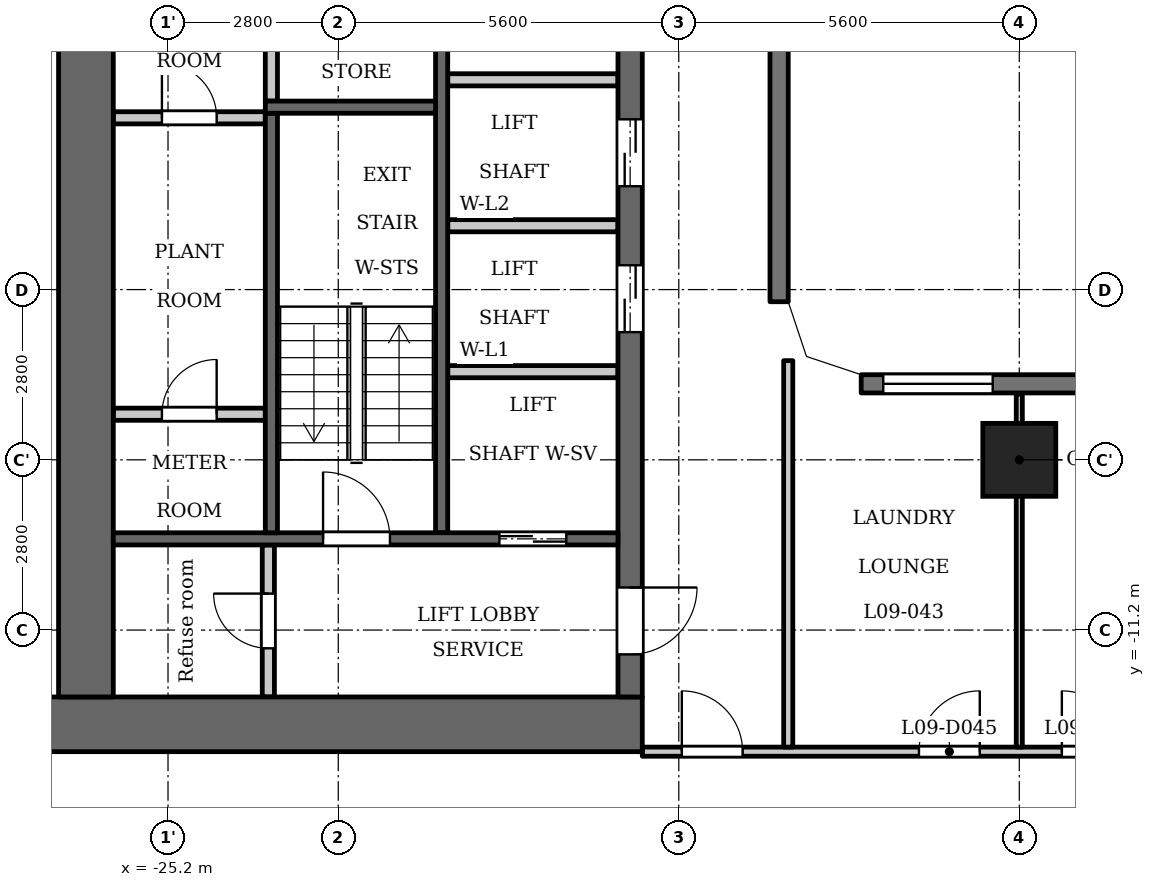
"""IFC4 building model, lengths in metres.
Left out: names, types, materials, properties, quantities, classifications, styles, units other than length and angle.
Written with IfcOpenShell. Run it as: python <this file> out.ifc"""

import sys

from ifc_helpers import new_model, si_unit, direction, frame, frame_2d, origin, origin_2d, place, context, subcontext, project, spatial, polyline, rectangle, outline, extrude, element, fill, save


model = new_model("IFC4")
c1 = context("Model", 3, precision=1e-05, world=origin(), true_north=direction((0.0, 1.0)))
c2 = subcontext(c1, "Body", "Model", "MODEL_VIEW")
j1 = project(units=[si_unit("LENGTHUNIT", "METRE"), si_unit("PLANEANGLEUNIT", "RADIAN")], contexts=[c1])
p1 = place(None, origin())
s1 = spatial("IfcSite", under=j1, at=p1, CompositionType="ELEMENT")
p2 = place(p1, origin())
s2 = spatial("IfcBuilding", under=s1, at=p2, CompositionType="ELEMENT")
p3 = place(p2, frame((0.0, 0.0, 41.0)))
s3 = spatial("IfcBuildingStorey", under=s2, at=p3, CompositionType="ELEMENT", Elevation=41.0)
p4 = place(p3, frame((-11.2, -8.4, 0.0), z_axis=(0.0, 0.0, 1.0), x_axis=(1.0, 0.0, 0.0)))
e1 = element("IfcColumn", 1, at=p4, inside=s3, PredefinedType="COLUMN", context=c2, shape_type="SweptSolid", body=[
    extrude(rectangle(XDim=1.2, YDim=1.2, at=origin_2d()), origin(), (0.0, 0.0, 1.0), 3.5),
])
p5 = place(p3, frame((-15.15, -5.8, 0.0), z_axis=(0.0, 0.0, 1.0), x_axis=(0.0, 1.0, 0.0)))
e2 = element("IfcWall", 2, at=p5, inside=s3, PredefinedType="SOLIDWALL", context=c2, shape_type="SweptSolid", body=[
    extrude(rectangle(XDim=11.6, YDim=0.3, at=frame_2d((5.8, 0.0))), origin(), (0.0, 0.0, 1.0), 3.2),
])
p6 = place(p3, frame((13.8, -7.15, 0.0), z_axis=(0.0, 0.0, 1.0), x_axis=(-1.0, 0.0, 0.0)))
e3 = element("IfcWall", 3, at=p6, inside=s3, PredefinedType="SOLIDWALL", context=c2, shape_type="SweptSolid", body=[
    extrude(rectangle(XDim=27.6, YDim=0.3, at=frame_2d((13.8, 0.0))), origin(), (0.0, 0.0, 1.0), 3.2),
])
p7 = place(p6, frame((0.363, 0.0, 0.9)))
e4 = element("IfcOpeningElement", 4, at=p7, cuts=e3, PredefinedType="OPENING", context=c2, shape_type="SweptSolid", body=[
    extrude(rectangle(XDim=1.8, YDim=1.25, at=frame_2d((0.9, 0.625))), frame((0.0, 0.16, 0.0), z_axis=(0.0, -1.0, 0.0), x_axis=(1.0, 0.0, 0.0)), (0.0, 0.0, 1.0), 0.32),
])
p8 = place(p6, frame((3.6, 0.0, 1.2)))
e5 = element("IfcOpeningElement", 5, at=p8, cuts=e3, PredefinedType="OPENING", context=c2, shape_type="SweptSolid", body=[
    extrude(rectangle(XDim=3.6, YDim=0.95, at=frame_2d((1.8, 0.475))), frame((0.0, 0.16, 0.0), z_axis=(0.0, -1.0, 0.0), x_axis=(1.0, 0.0, 0.0)), (0.0, 0.0, 1.0), 0.32),
])
p9 = place(p6, frame((9.2, 0.0, 1.2)))
e6 = element("IfcOpeningElement", 6, at=p9, cuts=e3, PredefinedType="OPENING", context=c2, shape_type="SweptSolid", body=[
    extrude(rectangle(XDim=3.6, YDim=0.95, at=frame_2d((1.8, 0.475))), frame((0.0, 0.16, 0.0), z_axis=(0.0, -1.0, 0.0), x_axis=(1.0, 0.0, 0.0)), (0.0, 0.0, 1.0), 0.32),
])
p10 = place(p6, frame((14.8, 0.0, 1.2)))
e7 = element("IfcOpeningElement", 7, at=p10, cuts=e3, PredefinedType="OPENING", context=c2, shape_type="SweptSolid", body=[
    extrude(rectangle(XDim=3.6, YDim=0.95, at=frame_2d((1.8, 0.475))), frame((0.0, 0.16, 0.0), z_axis=(0.0, -1.0, 0.0), x_axis=(1.0, 0.0, 0.0)), (0.0, 0.0, 1.0), 0.32),
])
p11 = place(p6, frame((20.4, 0.0, 1.2)))
e8 = element("IfcOpeningElement", 8, at=p11, cuts=e3, PredefinedType="OPENING", context=c2, shape_type="SweptSolid", body=[
    extrude(rectangle(XDim=3.6, YDim=0.95, at=frame_2d((1.8, 0.475))), frame((0.0, 0.16, 0.0), z_axis=(0.0, -1.0, 0.0), x_axis=(1.0, 0.0, 0.0)), (0.0, 0.0, 1.0), 0.32),
])
p12 = place(p6, frame((25.438, 0.0, 0.9)))
e9 = element("IfcOpeningElement", 9, at=p12, cuts=e3, PredefinedType="OPENING", context=c2, shape_type="SweptSolid", body=[
    extrude(rectangle(XDim=1.8, YDim=1.25, at=frame_2d((0.9, 0.625))), frame((0.0, 0.16, 0.0), z_axis=(0.0, -1.0, 0.0), x_axis=(1.0, 0.0, 0.0)), (0.0, 0.0, 1.0), 0.32),
])
p13 = place(p3, frame((-23.5, -2.5, 0.0), z_axis=(0.0, 0.0, 1.0), x_axis=(0.0, 1.0, 0.0)))
e10 = element("IfcWall", 10, at=p13, inside=s3, PredefinedType="PARTITIONING", context=c2, shape_type="SweptSolid", body=[
    extrude(rectangle(XDim=2.65, YDim=0.2, at=frame_2d((1.325, 0.0))), origin(), (0.0, 0.0, 1.0), 3.2),
])
p14 = place(p3, frame((-20.7, -9.6, 0.0), z_axis=(0.0, 0.0, 1.0), x_axis=(0.0, 1.0, 0.0)))
e11 = element("IfcWall", 11, at=p14, inside=s3, PredefinedType="SHEAR", context=c2, shape_type="SweptSolid", body=[
    extrude(rectangle(XDim=9.75, YDim=0.2, at=frame_2d((4.875, 0.0))), origin(), (0.0, 0.0, 1.0), 3.2),
])
p15 = place(p3, frame((-17.4, -12.75, 0.0), z_axis=(0.0, 0.0, 1.0), x_axis=(-1.0, 0.0, 0.0)))
e12 = element("IfcWall", 12, at=p15, inside=s3, PredefinedType="SHEAR", context=c2, shape_type="SweptSolid", body=[
    extrude(rectangle(XDim=10.4, YDim=0.9, at=frame_2d((5.2, 0.0))), origin(), (0.0, 0.0, 1.0), 3.2),
])
p16 = place(p3, frame((-17.6, -12.3, 0.0), z_axis=(0.0, 0.0, 1.0), x_axis=(0.0, 1.0, 0.0)))
e13 = element("IfcWall", 13, at=p16, inside=s3, PredefinedType="SHEAR", context=c2, shape_type="SweptSolid", body=[
    extrude(rectangle(XDim=24.6, YDim=0.4, at=frame_2d((12.3, 0.0))), origin(), (0.0, 0.0, 1.0), 3.2),
])
p17 = place(p16, frame((6.0, 0.0, 0.0)))
e14 = element("IfcOpeningElement", 14, at=p17, cuts=e13, PredefinedType="OPENING", context=c2, shape_type="SweptSolid", body=[
    extrude(rectangle(XDim=1.1, YDim=2.1, at=frame_2d((0.55, 1.05))), frame((0.0, 0.21, 0.0), z_axis=(0.0, -1.0, 0.0), x_axis=(1.0, 0.0, 0.0)), (0.0, 0.0, 1.0), 0.42),
])
p18 = place(p16, frame((8.4, 0.0, 0.0)))
e15 = element("IfcOpeningElement", 15, at=p18, cuts=e13, PredefinedType="OPENING", context=c2, shape_type="SweptSolid", body=[
    extrude(rectangle(XDim=1.1, YDim=2.1, at=frame_2d((0.55, 1.05))), frame((0.0, 0.21, 0.0), z_axis=(0.0, -1.0, 0.0), x_axis=(1.0, 0.0, 0.0)), (0.0, 0.0, 1.0), 0.42),
])
p19 = place(p16, frame((10.8, 0.0, 0.0)))
e16 = element("IfcOpeningElement", 16, at=p19, cuts=e13, PredefinedType="OPENING", context=c2, shape_type="SweptSolid", body=[
    extrude(rectangle(XDim=1.1, YDim=2.1, at=frame_2d((0.55, 1.05))), frame((0.0, 0.21, 0.0), z_axis=(0.0, -1.0, 0.0), x_axis=(1.0, 0.0, 0.0)), (0.0, 0.0, 1.0), 0.42),
])
p20 = place(p16, frame((16.75, 0.0, 0.0)))
e17 = element("IfcOpeningElement", 17, at=p20, cuts=e13, PredefinedType="OPENING", context=c2, shape_type="SweptSolid", body=[
    extrude(rectangle(XDim=0.9, YDim=2.1, at=frame_2d((0.45, 1.05))), frame((0.0, 0.21, 0.0), z_axis=(0.0, -1.0, 0.0), x_axis=(1.0, 0.0, 0.0)), (0.0, 0.0, 1.0), 0.42),
])
p21 = place(p16, frame((22.8, 0.0, 0.0)))
e18 = element("IfcOpeningElement", 18, at=p21, cuts=e13, PredefinedType="OPENING", context=c2, shape_type="SweptSolid", body=[
    extrude(rectangle(XDim=1.1, YDim=2.1, at=frame_2d((0.55, 1.05))), frame((0.0, 0.21, 0.0), z_axis=(0.0, -1.0, 0.0), x_axis=(1.0, 0.0, 0.0)), (0.0, 0.0, 1.0), 0.42),
])
p22 = place(p16, frame((0.7, 0.0, 0.0)))
e19 = element("IfcOpeningElement", 19, at=p22, cuts=e13, PredefinedType="OPENING", context=c2, shape_type="SweptSolid", body=[
    extrude(rectangle(XDim=1.1, YDim=2.1, at=frame_2d((0.55, 1.05))), frame((0.0, 0.21, 0.0), z_axis=(0.0, -1.0, 0.0), x_axis=(1.0, 0.0, 0.0)), (0.0, 0.0, 1.0), 0.42),
])
p23 = place(p16, frame((12.775, 0.0, 0.0)))
e20 = element("IfcOpeningElement", 20, at=p23, cuts=e13, PredefinedType="OPENING", context=c2, shape_type="SweptSolid", body=[
    extrude(rectangle(XDim=1.8, YDim=2.1, at=frame_2d((0.9, 1.05))), frame((0.0, 0.21, 0.0), z_axis=(0.0, -1.0, 0.0), x_axis=(1.0, 0.0, 0.0)), (0.0, 0.0, 1.0), 0.42),
])
p24 = place(p3, frame((-26.55, -12.3, 0.0), z_axis=(0.0, 0.0, 1.0), x_axis=(0.0, 1.0, 0.0)))
e21 = element("IfcWall", 21, at=p24, inside=s3, PredefinedType="SHEAR", context=c2, shape_type="SweptSolid", body=[
    extrude(rectangle(XDim=24.6, YDim=0.9, at=frame_2d((12.3, 0.0))), origin(), (0.0, 0.0, 1.0), 3.2),
])
p25 = place(p3, frame((-23.55, -12.3, 0.0), z_axis=(0.0, 0.0, 1.0), x_axis=(0.0, 1.0, 0.0)))
e22 = element("IfcWall", 22, at=p25, inside=s3, PredefinedType="PARTITIONING", context=c2, shape_type="SweptSolid", body=[
    extrude(rectangle(XDim=2.5, YDim=0.2, at=frame_2d((1.25, 0.0))), origin(), (0.0, 0.0, 1.0), 3.2),
])
p26 = place(p25, frame((0.8, 0.0, 0.0)))
e23 = element("IfcOpeningElement", 23, at=p26, cuts=e22, PredefinedType="OPENING", context=c2, shape_type="SweptSolid", body=[
    extrude(rectangle(XDim=0.9, YDim=2.1, at=frame_2d((0.45, 1.05))), frame((0.0, 0.11, 0.0), z_axis=(0.0, -1.0, 0.0), x_axis=(1.0, 0.0, 0.0)), (0.0, 0.0, 1.0), 0.22),
])
p27 = place(p3, frame((-23.6, -7.65, 0.0), z_axis=(0.0, 0.0, 1.0), x_axis=(-1.0, 0.0, 0.0)))
e24 = element("IfcWall", 24, at=p27, inside=s3, PredefinedType="PARTITIONING", context=c2, shape_type="SweptSolid", body=[
    extrude(rectangle(XDim=2.5, YDim=0.2, at=frame_2d((1.25, 0.0))), origin(), (0.0, 0.0, 1.0), 3.2),
])
p28 = place(p27, frame((0.8, 0.0, 0.0)))
e25 = element("IfcOpeningElement", 25, at=p28, cuts=e24, PredefinedType="OPENING", context=c2, shape_type="SweptSolid", body=[
    extrude(rectangle(XDim=0.9, YDim=2.1, at=frame_2d((0.45, 1.05))), frame((0.0, 0.11, 0.0), z_axis=(0.0, -1.0, 0.0), x_axis=(1.0, 0.0, 0.0)), (0.0, 0.0, 1.0), 0.22),
])
p29 = place(p3, frame((-23.6, -2.775, 0.0), z_axis=(0.0, 0.0, 1.0), x_axis=(-1.0, 0.0, 0.0)))
e26 = element("IfcWall", 26, at=p29, inside=s3, PredefinedType="PARTITIONING", context=c2, shape_type="SweptSolid", body=[
    extrude(rectangle(XDim=2.5, YDim=0.2, at=frame_2d((1.25, 0.0))), origin(), (0.0, 0.0, 1.0), 3.2),
])
p30 = place(p29, frame((0.8, 0.0, 0.0)))
e27 = element("IfcOpeningElement", 27, at=p30, cuts=e26, PredefinedType="OPENING", context=c2, shape_type="SweptSolid", body=[
    extrude(rectangle(XDim=0.9, YDim=2.1, at=frame_2d((0.45, 1.05))), frame((0.0, 0.11, 0.0), z_axis=(0.0, -1.0, 0.0), x_axis=(1.0, 0.0, 0.0)), (0.0, 0.0, 1.0), 0.22),
])
p31 = place(p3, frame((-17.8, -9.7, 0.0), z_axis=(0.0, 0.0, 1.0), x_axis=(-1.0, 0.0, 0.0)))
e28 = element("IfcWall", 28, at=p31, inside=s3, PredefinedType="SHEAR", context=c2, shape_type="SweptSolid", body=[
    extrude(rectangle(XDim=8.3, YDim=0.2, at=frame_2d((4.15, 0.0))), origin(), (0.0, 0.0, 1.0), 3.2),
])
p32 = place(p31, frame((0.85, 0.0, 0.0)))
e29 = element("IfcOpeningElement", 29, at=p32, cuts=e28, PredefinedType="OPENING", context=c2, shape_type="SweptSolid", body=[
    extrude(rectangle(XDim=1.1, YDim=2.1, at=frame_2d((0.55, 1.05))), frame((0.0, 0.11, 0.0), z_axis=(0.0, -1.0, 0.0), x_axis=(1.0, 0.0, 0.0)), (0.0, 0.0, 1.0), 0.22),
])
p33 = place(p31, frame((3.75, 0.0, 0.0)))
e30 = element("IfcOpeningElement", 30, at=p33, cuts=e28, PredefinedType="OPENING", context=c2, shape_type="SweptSolid", body=[
    extrude(rectangle(XDim=1.1, YDim=2.1, at=frame_2d((0.55, 1.05))), frame((0.0, 0.11, 0.0), z_axis=(0.0, -1.0, 0.0), x_axis=(1.0, 0.0, 0.0)), (0.0, 0.0, 1.0), 0.22),
])
for number, where, z_axis, x_axis in (
    (31, (-17.8, -6.95, 0.0), (0.0, 0.0, 1.0), (-1.0, 0.0, 0.0)),
    (32, (-17.8, -4.55, 0.0), (0.0, 0.0, 1.0), (-1.0, 0.0, 0.0)),
    (33, (-17.8, -2.15, 0.0), (0.0, 0.0, 1.0), (-1.0, 0.0, 0.0)),
):
    element("IfcWall", number, at=place(p3, frame(where, z_axis=z_axis, x_axis=x_axis)), inside=s3, PredefinedType="PARTITIONING", context=c2, shape_type="SweptSolid", body=[
        extrude(rectangle(XDim=2.8, YDim=0.2, at=frame_2d((1.4, 0.0))), origin(), (0.0, 0.0, 1.0), 3.2),
    ])
p34 = place(p3, frame((-23.5, -9.6, 0.0), z_axis=(0.0, 0.0, 1.0), x_axis=(0.0, 1.0, 0.0)))
e34 = element("IfcWall", 34, at=p34, inside=s3, PredefinedType="SHEAR", context=c2, shape_type="SweptSolid", body=[
    extrude(rectangle(XDim=6.9, YDim=0.2, at=frame_2d((3.45, 0.0))), origin(), (0.0, 0.0, 1.0), 3.2),
])
p35 = place(p3, frame((-20.8, -2.6, 0.0), z_axis=(0.0, 0.0, 1.0), x_axis=(-1.0, 0.0, 0.0)))
e35 = element("IfcWall", 35, at=p35, inside=s3, PredefinedType="SHEAR", context=c2, shape_type="SweptSolid", body=[
    extrude(rectangle(XDim=2.8, YDim=0.2, at=frame_2d((1.4, 0.0))), origin(), (0.0, 0.0, 1.0), 3.2),
])
p36 = place(p3, frame((-17.4, -13.2, 0.0), z_axis=(0.0, 0.0, 1.0), x_axis=(1.0, 0.0, 0.0)))
e36 = element("IfcWall", 36, at=p36, inside=s3, PredefinedType="PARTITIONING", context=c2, shape_type="SweptSolid", body=[
    extrude(rectangle(XDim=34.8, YDim=0.15, at=frame_2d((17.4, 0.0))), origin(), (0.0, 0.0, 1.0), 3.2),
])
p37 = place(p36, frame((0.65, 0.0, 0.0)))
e37 = element("IfcOpeningElement", 37, at=p37, cuts=e36, PredefinedType="OPENING", context=c2, shape_type="SweptSolid", body=[
    extrude(rectangle(XDim=1.0, YDim=2.1, at=frame_2d((0.5, 1.05))), frame((0.0, 0.085, 0.0), z_axis=(0.0, -1.0, 0.0), x_axis=(1.0, 0.0, 0.0)), (0.0, 0.0, 1.0), 0.17),
])
p38 = place(p36, frame((33.05, 0.0, 0.0)))
e38 = element("IfcOpeningElement", 38, at=p38, cuts=e36, PredefinedType="OPENING", context=c2, shape_type="SweptSolid", body=[
    extrude(rectangle(XDim=1.0, YDim=2.1, at=frame_2d((0.5, 1.05))), frame((0.0, 0.085, 0.0), z_axis=(0.0, -1.0, 0.0), x_axis=(1.0, 0.0, 0.0)), (0.0, 0.0, 1.0), 0.17),
])
p39 = place(p36, frame((4.55, 0.0, 0.0)))
e39 = element("IfcOpeningElement", 39, at=p39, cuts=e36, PredefinedType="OPENING", context=c2, shape_type="SweptSolid", body=[
    extrude(rectangle(XDim=1.0, YDim=2.1, at=frame_2d((0.5, 1.05))), frame((0.0, 0.085, 0.0), z_axis=(0.0, -1.0, 0.0), x_axis=(1.0, 0.0, 0.0)), (0.0, 0.0, 1.0), 0.17),
])
p40 = place(p36, frame((6.9, 0.0, 0.0)))
e40 = element("IfcOpeningElement", 40, at=p40, cuts=e36, PredefinedType="OPENING", context=c2, shape_type="SweptSolid", body=[
    extrude(rectangle(XDim=1.0, YDim=2.1, at=frame_2d((0.5, 1.05))), frame((0.0, 0.085, 0.0), z_axis=(0.0, -1.0, 0.0), x_axis=(1.0, 0.0, 0.0)), (0.0, 0.0, 1.0), 0.17),
])
p41 = place(p36, frame((15.75, 0.0, 0.0)))
e41 = element("IfcOpeningElement", 41, at=p41, cuts=e36, PredefinedType="OPENING", context=c2, shape_type="SweptSolid", body=[
    extrude(rectangle(XDim=1.0, YDim=2.1, at=frame_2d((0.5, 1.05))), frame((0.0, 0.085, 0.0), z_axis=(0.0, -1.0, 0.0), x_axis=(1.0, 0.0, 0.0)), (0.0, 0.0, 1.0), 0.17),
])
p42 = place(p36, frame((18.1, 0.0, 0.0)))
e42 = element("IfcOpeningElement", 42, at=p42, cuts=e36, PredefinedType="OPENING", context=c2, shape_type="SweptSolid", body=[
    extrude(rectangle(XDim=1.0, YDim=2.1, at=frame_2d((0.5, 1.05))), frame((0.0, 0.085, 0.0), z_axis=(0.0, -1.0, 0.0), x_axis=(1.0, 0.0, 0.0)), (0.0, 0.0, 1.0), 0.17),
])
p43 = place(p36, frame((26.95, 0.0, 0.0)))
e43 = element("IfcOpeningElement", 43, at=p43, cuts=e36, PredefinedType="OPENING", context=c2, shape_type="SweptSolid", body=[
    extrude(rectangle(XDim=1.0, YDim=2.1, at=frame_2d((0.5, 1.05))), frame((0.0, 0.085, 0.0), z_axis=(0.0, -1.0, 0.0), x_axis=(1.0, 0.0, 0.0)), (0.0, 0.0, 1.0), 0.17),
])
p44 = place(p36, frame((29.25, 0.0, 0.0)))
e44 = element("IfcOpeningElement", 44, at=p44, cuts=e36, PredefinedType="OPENING", context=c2, shape_type="SweptSolid", body=[
    extrude(rectangle(XDim=1.0, YDim=2.1, at=frame_2d((0.5, 1.05))), frame((0.0, 0.085, 0.0), z_axis=(0.0, -1.0, 0.0), x_axis=(1.0, 0.0, 0.0)), (0.0, 0.0, 1.0), 0.17),
])
p45 = place(p3, frame((-15.0, -13.125, 0.0), z_axis=(0.0, 0.0, 1.0), x_axis=(0.0, 1.0, 0.0)))
e45 = element("IfcWall", 45, at=p45, inside=s3, PredefinedType="PARTITIONING", context=c2, shape_type="SweptSolid", body=[
    extrude(rectangle(XDim=6.356, YDim=0.15, at=frame_2d((3.178, 0.0))), origin(), (0.0, 0.0, 1.0), 3.2),
])
p46 = place(p3, frame((-11.2, -13.125, 0.0), z_axis=(0.0, 0.0, 1.0), x_axis=(0.0, 1.0, 0.0)))
e46 = element("IfcWall", 46, at=p46, inside=s3, PredefinedType="PARTITIONING", context=c2, shape_type="SweptSolid", body=[
    extrude(rectangle(XDim=5.805, YDim=0.1, at=frame_2d((2.902, 0.0))), origin(), (0.0, 0.0, 1.0), 3.2),
])
p47 = place(p3, origin())
e47 = element("IfcWall", 47, at=p47, inside=s3, PredefinedType="SOLIDWALL", context=c2, shape_type="SweptSolid", body=[
    extrude(outline(polyline([(-14.937, -6.937), (-13.849, -7.3), (-13.8, -7.3), (-13.8, -7.0), (-14.7, -6.7), (-15.0, -5.8), (-15.3, -5.8), (-15.3, -5.849), (-14.937, -6.937)])), origin(), (0.0, 0.0, 1.0), 3.2),
])
p48 = place(p32, origin())
e48 = element("IfcDoor", 48, at=p48, inside=s3, OperationType="DOUBLE_DOOR_SLIDING", PredefinedType="DOOR", context=c2, shape_type="SweptSolid", body=[
    extrude(rectangle(XDim=1.1, YDim=2.1, at=frame_2d((0.55, 1.05))), frame((0.0, 0.025, 0.0), z_axis=(0.0, -1.0, 0.0), x_axis=(1.0, 0.0, 0.0)), (0.0, 0.0, 1.0), 0.05),
])
fill(e29, e48)
p49 = place(p17, origin())
e49 = element("IfcDoor", 49, at=p49, inside=s3, OperationType="DOUBLE_DOOR_SLIDING", PredefinedType="DOOR", context=c2, shape_type="SweptSolid", body=[
    extrude(rectangle(XDim=1.1, YDim=2.1, at=frame_2d((0.55, 1.05))), frame((0.0, 0.025, 0.0), z_axis=(0.0, -1.0, 0.0), x_axis=(1.0, 0.0, 0.0)), (0.0, 0.0, 1.0), 0.05),
])
fill(e14, e49)
p50 = place(p18, origin())
e50 = element("IfcDoor", 50, at=p50, inside=s3, OperationType="DOUBLE_DOOR_SLIDING", PredefinedType="DOOR", context=c2, shape_type="SweptSolid", body=[
    extrude(rectangle(XDim=1.1, YDim=2.1, at=frame_2d((0.55, 1.05))), frame((0.0, 0.025, 0.0), z_axis=(0.0, -1.0, 0.0), x_axis=(1.0, 0.0, 0.0)), (0.0, 0.0, 1.0), 0.05),
])
fill(e15, e50)
p51 = place(p22, origin())
e51 = element("IfcDoor", 51, at=p51, inside=s3, OperationType="SINGLE_SWING_RIGHT", PredefinedType="DOOR", context=c2, shape_type="SweptSolid", body=[
    extrude(rectangle(XDim=1.1, YDim=2.1, at=frame_2d((0.55, 1.05))), frame((0.0, 0.025, 0.0), z_axis=(0.0, -1.0, 0.0), x_axis=(1.0, 0.0, 0.0)), (0.0, 0.0, 1.0), 0.05),
])
fill(e19, e51)
p52 = place(p26, origin())
e52 = element("IfcDoor", 52, at=p52, inside=s3, OperationType="SINGLE_SWING_LEFT", PredefinedType="DOOR", context=c2, shape_type="SweptSolid", body=[
    extrude(rectangle(XDim=0.9, YDim=2.1, at=frame_2d((0.45, 1.05))), frame((0.0, 0.025, 0.0), z_axis=(0.0, -1.0, 0.0), x_axis=(1.0, 0.0, 0.0)), (0.0, 0.0, 1.0), 0.05),
])
fill(e23, e52)
p53 = place(p33, origin())
e53 = element("IfcDoor", 53, at=p53, inside=s3, OperationType="SINGLE_SWING_RIGHT", PredefinedType="DOOR", context=c2, shape_type="SweptSolid", body=[
    extrude(rectangle(XDim=1.1, YDim=2.1, at=frame_2d((0.55, 1.05))), frame((0.0, 0.025, 0.0), z_axis=(0.0, -1.0, 0.0), x_axis=(1.0, 0.0, 0.0)), (0.0, 0.0, 1.0), 0.05),
])
fill(e30, e53)
p54 = place(p28, origin())
e54 = element("IfcDoor", 54, at=p54, inside=s3, OperationType="SINGLE_SWING_LEFT", PredefinedType="DOOR", context=c2, shape_type="SweptSolid", body=[
    extrude(rectangle(XDim=0.9, YDim=2.1, at=frame_2d((0.45, 1.05))), frame((0.0, 0.025, 0.0), z_axis=(0.0, -1.0, 0.0), x_axis=(1.0, 0.0, 0.0)), (0.0, 0.0, 1.0), 0.05),
])
fill(e25, e54)
p55 = place(p30, origin())
e55 = element("IfcDoor", 55, at=p55, inside=s3, OperationType="SINGLE_SWING_RIGHT", PredefinedType="DOOR", context=c2, shape_type="SweptSolid", body=[
    extrude(rectangle(XDim=0.9, YDim=2.1, at=frame_2d((0.45, 1.05))), frame((0.0, 0.025, 0.0), z_axis=(0.0, -1.0, 0.0), x_axis=(1.0, 0.0, 0.0)), (0.0, 0.0, 1.0), 0.05),
])
fill(e27, e55)
p56 = place(p37, origin())
e56 = element("IfcDoor", 56, at=p56, inside=s3, OperationType="SINGLE_SWING_RIGHT", PredefinedType="DOOR", context=c2, shape_type="SweptSolid", body=[
    extrude(rectangle(XDim=1.0, YDim=2.1, at=frame_2d((0.5, 1.05))), frame((0.0, 0.025, 0.0), z_axis=(0.0, -1.0, 0.0), x_axis=(1.0, 0.0, 0.0)), (0.0, 0.0, 1.0), 0.05),
])
fill(e37, e56)
p57 = place(p39, origin())
e57 = element("IfcDoor", 57, at=p57, inside=s3, OperationType="SINGLE_SWING_LEFT", PredefinedType="DOOR", context=c2, shape_type="SweptSolid", body=[
    extrude(rectangle(XDim=1.0, YDim=2.1, at=frame_2d((0.5, 1.05))), frame((0.0, 0.025, 0.0), z_axis=(0.0, -1.0, 0.0), x_axis=(1.0, 0.0, 0.0)), (0.0, 0.0, 1.0), 0.05),
])
fill(e39, e57)
p58 = place(p40, origin())
e58 = element("IfcDoor", 58, at=p58, inside=s3, OperationType="SINGLE_SWING_RIGHT", PredefinedType="DOOR", context=c2, shape_type="SweptSolid", body=[
    extrude(rectangle(XDim=1.0, YDim=2.1, at=frame_2d((0.5, 1.05))), frame((0.0, 0.025, 0.0), z_axis=(0.0, -1.0, 0.0), x_axis=(1.0, 0.0, 0.0)), (0.0, 0.0, 1.0), 0.05),
])
fill(e40, e58)
p59 = place(p12, origin())
e59 = element("IfcWindow", 59, at=p59, inside=s3, PartitioningType="SINGLE_PANEL", PredefinedType="WINDOW", context=c2, shape_type="SweptSolid", body=[
    extrude(rectangle(XDim=1.8, YDim=1.25, at=frame_2d((0.9, 0.625))), frame((0.0, 0.03, 0.0), z_axis=(0.0, -1.0, 0.0), x_axis=(1.0, 0.0, 0.0)), (0.0, 0.0, 1.0), 0.06),
])
fill(e9, e59)
save(model, sys.argv[1])
